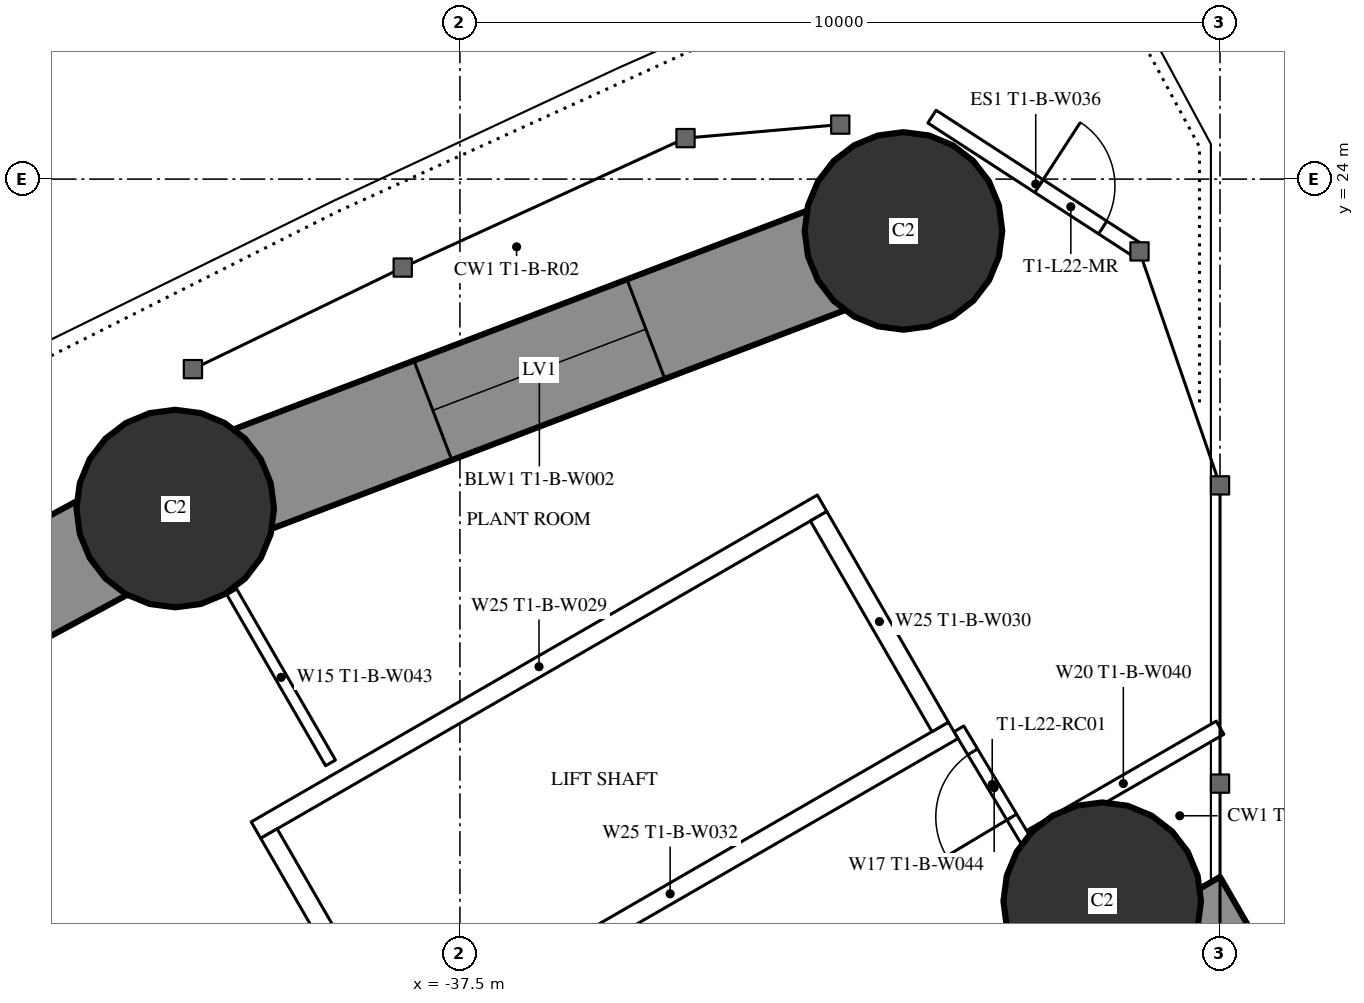
"""IFC4 building model, lengths in metres.
Left out: names, types, materials, properties, quantities, classifications, styles, units other than length and angle.
Written with IfcOpenShell. Run it as: python <this file> out.ifc"""

import sys

from ifc_helpers import new_model, si_unit, direction, frame, frame_2d, origin, origin_2d, place, context, subcontext, project, spatial, rectangle, hollow_circle, extrude, element, fill, save


model = new_model("IFC4")
c1 = context("Model", 3, precision=1e-05, world=origin(), true_north=direction((0.0, 1.0)))
c2 = subcontext(c1, "Body", "Model", "MODEL_VIEW")
j1 = project(units=[si_unit("LENGTHUNIT", "METRE"), si_unit("PLANEANGLEUNIT", "RADIAN")], contexts=[c1])
p1 = place(None, origin())
s1 = spatial("IfcSite", under=j1, at=p1, CompositionType="ELEMENT")
p2 = place(p1, origin())
s2 = spatial("IfcBuilding", under=s1, at=p2, CompositionType="ELEMENT")
p3 = place(p2, frame((0.0, 0.0, 87.0)))
s3 = spatial("IfcBuildingStorey", under=s2, at=p3, CompositionType="ELEMENT", Elevation=87.0)
for number, where, z_axis, x_axis in (
    (1, (-31.665, 23.318, 0.0), (0.0, 0.0, 1.0), (1.0, 0.0, 0.0)),
    (2, (-29.05, 14.5, 0.0), (0.0, 0.0, 1.0), (1.0, 0.0, 0.0)),
    (3, (-41.245, 19.666, 0.0), (0.0, 0.0, 1.0), (1.0, 0.0, 0.0)),
):
    element("IfcColumn", number, at=place(p3, frame(where, z_axis=z_axis, x_axis=x_axis)), inside=s3, PredefinedType="COLUMN", context=c2, shape_type="SweptSolid", body=[
        extrude(hollow_circle(Radius=1.3, WallThickness=0.1, at=origin_2d()), origin(), (0.0, 0.0, 1.0), 3.6),
    ])
p4 = place(p3, frame((-27.2, 14.3, 0.0), z_axis=(0.0, 0.0, 1.0), x_axis=(-0.866026593062, -0.499997940104, 0.0)))
e4 = element("IfcWall", 4, at=p4, inside=s3, PredefinedType="SHEAR", context=c2, shape_type="SweptSolid", body=[
    extrude(rectangle(XDim=28.946, YDim=1.2, at=frame_2d((14.473, 0.0))), origin(), (0.0, 0.0, 1.0), 3.6),
])
p5 = place(p4, frame((4.6, 0.0, 0.0)))
e5 = element("IfcOpeningElement", 5, at=p5, cuts=e4, PredefinedType="OPENING", context=c2, shape_type="SweptSolid", body=[
    extrude(rectangle(XDim=1.0, YDim=2.2, at=frame_2d((0.5, 1.1))), frame((0.0, 0.61, 0.0), z_axis=(0.0, -1.0, 0.0), x_axis=(1.0, 0.0, 0.0)), (0.0, 0.0, 1.0), 1.22),
])
p6 = place(p4, frame((13.568, 0.0, 0.0)))
e6 = element("IfcOpeningElement", 6, at=p6, cuts=e4, PredefinedType="OPENING", context=c2, shape_type="SweptSolid", body=[
    extrude(rectangle(XDim=1.8, YDim=2.03, at=frame_2d((0.9, 1.015))), frame((0.0, 0.61, 0.0), z_axis=(0.0, -1.0, 0.0), x_axis=(1.0, 0.0, 0.0)), (0.0, 0.0, 1.0), 1.22),
])
p7 = place(p3, frame((-31.665, 23.318, 0.0), z_axis=(0.0, 0.0, 1.0), x_axis=(-0.934392266213, -0.356245832033, 0.0)))
e7 = element("IfcWall", 7, at=p7, inside=s3, PredefinedType="SHEAR", context=c2, shape_type="SweptSolid", body=[
    extrude(rectangle(XDim=10.253, YDim=1.4, at=frame_2d((5.126, 0.0))), origin(), (0.0, 0.0, 1.0), 3.6),
])
p8 = place(p7, frame((3.626, 0.0, 0.6)))
e8 = element("IfcOpeningElement", 8, at=p8, cuts=e7, PredefinedType="OPENING", context=c2, shape_type="SweptSolid", body=[
    extrude(rectangle(XDim=3.0, YDim=1.2, at=frame_2d((1.5, 0.6))), frame((0.0, 0.71, 0.0), z_axis=(0.0, -1.0, 0.0), x_axis=(1.0, 0.0, 0.0)), (0.0, 0.0, 1.0), 1.42),
])
p9 = place(p3, frame((-41.245, 19.666, 0.0), z_axis=(0.0, 0.0, 1.0), x_axis=(-0.880492350889, -0.474060354835, 0.0)))
e9 = element("IfcWall", 9, at=p9, inside=s3, PredefinedType="SHEAR", context=c2, shape_type="SweptSolid", body=[
    extrude(rectangle(XDim=12.173, YDim=1.4, at=frame_2d((6.086, 0.0))), origin(), (0.0, 0.0, 1.0), 3.6),
])
p10 = place(p9, frame((4.586, 0.0, 0.6)))
e10 = element("IfcOpeningElement", 10, at=p10, cuts=e9, PredefinedType="OPENING", context=c2, shape_type="SweptSolid", body=[
    extrude(rectangle(XDim=3.0, YDim=1.2, at=frame_2d((1.5, 0.6))), frame((0.0, 0.71, 0.0), z_axis=(0.0, -1.0, 0.0), x_axis=(1.0, 0.0, 0.0)), (0.0, 0.0, 1.0), 1.42),
])
p11 = place(p3, frame((-31.289, 24.822, 0.0), z_axis=(0.0, 0.0, 1.0), x_axis=(0.838602944288, -0.544743152166, 0.0)))
e11 = element("IfcWall", 11, at=p11, inside=s3, PredefinedType="STANDARD", context=c2, shape_type="SweptSolid", body=[
    extrude(rectangle(XDim=3.255, YDim=0.2, at=frame_2d((1.627, 0.0))), origin(), (0.0, 0.0, 1.0), 3.35),
])
p12 = place(p11, frame((1.678, 0.0, 0.0)))
e12 = element("IfcOpeningElement", 12, at=p12, cuts=e11, PredefinedType="OPENING", context=c2, shape_type="SweptSolid", body=[
    extrude(rectangle(XDim=1.0, YDim=2.2, at=frame_2d((0.5, 1.1))), frame((0.0, 0.11, 0.0), z_axis=(0.0, -1.0, 0.0), x_axis=(1.0, 0.0, 0.0)), (0.0, 0.0, 1.0), 0.22),
])
p13 = place(p3, frame((-39.202, 16.32, 0.0), z_axis=(0.0, 0.0, 1.0), x_axis=(-0.499947391036, 0.866055775454, 0.0)))
e13 = element("IfcWall", 13, at=p13, inside=s3, PredefinedType="PARTITIONING", context=c2, shape_type="SweptSolid", body=[
    extrude(rectangle(XDim=2.599, YDim=0.15, at=frame_2d((1.3, 0.0))), origin(), (0.0, 0.0, 1.0), 3.35),
])
p14 = place(p3, frame((-27.5, 16.782, 0.0), z_axis=(0.0, 0.0, 1.0), x_axis=(-0.866045812642, -0.499964649156, 0.0)))
e14 = element("IfcWall", 14, at=p14, inside=s3, PredefinedType="PARTITIONING", context=c2, shape_type="SweptSolid", body=[
    extrude(rectangle(XDim=2.938, YDim=0.2, at=frame_2d((1.469, 0.0))), origin(), (0.0, 0.0, 1.0), 3.35),
])
p15 = place(p3, frame((-30.007, 15.219, 0.0), z_axis=(0.0, 0.0, 1.0), x_axis=(-0.514296815006, 0.857612258585, 0.0)))
e15 = element("IfcWall", 15, at=p15, inside=s3, PredefinedType="PARTITIONING", context=c2, shape_type="SweptSolid", body=[
    extrude(rectangle(XDim=1.805, YDim=0.15, at=frame_2d((0.902, 0.0))), origin(), (0.0, 0.0, 1.0), 2.3),
])
p16 = place(p15, frame((0.452, 0.0, 0.0)))
e16 = element("IfcOpeningElement", 16, at=p16, cuts=e15, PredefinedType="OPENING", context=c2, shape_type="SweptSolid", body=[
    extrude(rectangle(XDim=1.0, YDim=2.03, at=frame_2d((0.5, 1.015))), frame((0.0, 0.085, 0.0), z_axis=(0.0, -1.0, 0.0), x_axis=(1.0, 0.0, 0.0)), (0.0, 0.0, 1.0), 0.17),
])
for number, where, z_axis, x_axis in (
    (17, (-31.01, 16.747, 0.0), (0.0, 0.0, 1.0), (-0.866, -0.5, 0.0)),
    (18, (-32.736, 19.736, 0.0), (0.0, 0.0, 1.0), (-0.866, -0.5, 0.0)),
):
    element("IfcWall", number, at=place(p3, frame(where, z_axis=z_axis, x_axis=x_axis)), inside=s3, PredefinedType="PARTITIONING", context=c2, shape_type="SweptSolid", body=[
        extrude(rectangle(XDim=8.6, YDim=0.25, at=frame_2d((4.3, 0.0))), origin(), (0.0, 0.0, 1.0), 3.35),
    ])
p17 = place(p3, frame((-31.181, 16.793, 0.0), z_axis=(0.0, 0.0, 1.0), x_axis=(-0.499929347863, 0.866066190972, 0.0)))
e19 = element("IfcWall", 19, at=p17, inside=s3, PredefinedType="PARTITIONING", context=c2, shape_type="SweptSolid", body=[
    extrude(rectangle(XDim=3.201, YDim=0.25, at=frame_2d((1.6, 0.0))), origin(), (0.0, 0.0, 1.0), 3.35),
])
p18 = place(p3, frame((-38.413, 12.618, 0.0), z_axis=(0.0, 0.0, 1.0), x_axis=(-0.499872130319, 0.866099216793, 0.0)))
e20 = element("IfcWall", 20, at=p18, inside=s3, PredefinedType="PARTITIONING", context=c2, shape_type="SweptSolid", body=[
    extrude(rectangle(XDim=3.2, YDim=0.25, at=frame_2d((1.6, 0.0))), origin(), (0.0, 0.0, 1.0), 3.35),
])
p19 = place(p8, origin())
e21 = element("IfcWindow", 21, at=p19, inside=s3, PartitioningType="SINGLE_PANEL", PredefinedType="WINDOW", context=c2, shape_type="SweptSolid", body=[
    extrude(rectangle(XDim=3.0, YDim=1.2, at=frame_2d((1.5, 0.6))), frame((0.0, 0.03, 0.0), z_axis=(0.0, -1.0, 0.0), x_axis=(1.0, 0.0, 0.0)), (0.0, 0.0, 1.0), 0.06),
])
fill(e8, e21)
p20 = place(p12, origin())
e22 = element("IfcDoor", 22, at=p20, inside=s3, OperationType="SINGLE_SWING_LEFT", PredefinedType="DOOR", context=c2, shape_type="SweptSolid", body=[
    extrude(rectangle(XDim=1.0, YDim=2.2, at=frame_2d((0.5, 1.1))), frame((0.0, 0.025, 0.0), z_axis=(0.0, -1.0, 0.0), x_axis=(1.0, 0.0, 0.0)), (0.0, 0.0, 1.0), 0.05),
])
fill(e12, e22)
p21 = place(p16, origin())
e23 = element("IfcDoor", 23, at=p21, inside=s3, OperationType="SINGLE_SWING_LEFT", PredefinedType="DOOR", context=c2, shape_type="SweptSolid", body=[
    extrude(rectangle(XDim=1.0, YDim=2.03, at=frame_2d((0.5, 1.015))), frame((0.0, 0.025, 0.0), z_axis=(0.0, -1.0, 0.0), x_axis=(1.0, 0.0, 0.0)), (0.0, 0.0, 1.0), 0.05),
])
fill(e16, e23)
save(model, sys.argv[1])
